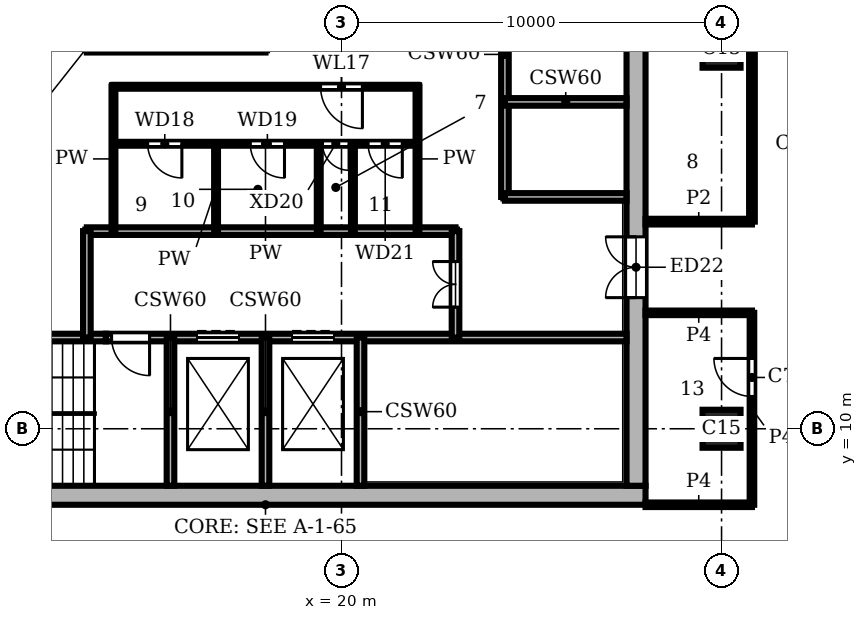
"""IFC4 building model, lengths in metres.
Left out: names, types, materials, properties, quantities, classifications, styles, units other than length and angle.
Written with IfcOpenShell. Run it as: python <this file> out.ifc"""

import sys

from ifc_helpers import new_model, si_unit, direction, frame, frame_2d, origin, origin_2d, place, context, subcontext, project, spatial, rectangle, extrude, element, fill, save


model = new_model("IFC4")
c1 = context("Model", 3, precision=1e-05, world=origin(), true_north=direction((0.0, 1.0)))
c2 = subcontext(c1, "Body", "Model", "MODEL_VIEW")
j1 = project(units=[si_unit("LENGTHUNIT", "METRE"), si_unit("PLANEANGLEUNIT", "RADIAN")], contexts=[c1])
p1 = place(None, origin())
s1 = spatial("IfcSite", under=j1, at=p1, CompositionType="ELEMENT")
p2 = place(p1, origin())
s2 = spatial("IfcBuilding", under=s1, at=p2, CompositionType="ELEMENT")
p3 = place(p2, frame((0.0, 0.0, 309.9)))
s3 = spatial("IfcBuildingStorey", under=s2, at=p3, CompositionType="ELEMENT", Elevation=309.9)
for number, where, z_axis, x_axis in (
    (1, (30.0, 10.0, 0.0), (0.0, 0.0, 1.0), (1.0, 0.0, 0.0)),
    (2, (30.0, 20.0, 0.0), (0.0, 0.0, 1.0), (1.0, 0.0, 0.0)),
):
    element("IfcColumn", number, at=place(p3, frame(where, z_axis=z_axis, x_axis=x_axis)), inside=s3, PredefinedType="COLUMN", context=c2, shape_type="SweptSolid", body=[
        extrude(rectangle(XDim=1.0, YDim=1.0, at=origin_2d()), origin(), (0.0, 0.0, 1.0), 3.9),
    ])
p4 = place(p3, frame((8.0, 8.25, 0.0), z_axis=(0.0, 0.0, 1.0), x_axis=(1.0, 0.0, 0.0)))
e3 = element("IfcWall", 3, at=p4, inside=s3, PredefinedType="SHEAR", context=c2, shape_type="SweptSolid", body=[
    extrude(rectangle(XDim=20.0, YDim=0.5, at=frame_2d((10.0, 0.0))), origin(), (0.0, 0.0, 1.0), 3.9),
])
p5 = place(p3, frame((27.75, 8.5, 0.0), z_axis=(0.0, 0.0, 1.0), x_axis=(0.0, 1.0, 0.0)))
e4 = element("IfcWall", 4, at=p5, inside=s3, PredefinedType="SHEAR", context=c2, shape_type="SweptSolid", body=[
    extrude(rectangle(XDim=19.0, YDim=0.5, at=frame_2d((9.5, 0.0))), origin(), (0.0, 0.0, 1.0), 3.9),
])
p6 = place(p5, frame((4.95, 0.0, 0.0)))
e5 = element("IfcOpeningElement", 5, at=p6, cuts=e4, PredefinedType="OPENING", context=c2, shape_type="SweptSolid", body=[
    extrude(rectangle(XDim=1.6, YDim=2.1, at=frame_2d((0.8, 1.05))), frame((0.0, 0.26, 0.0), z_axis=(0.0, -1.0, 0.0), x_axis=(1.0, 0.0, 0.0)), (0.0, 0.0, 1.0), 0.52),
])
p7 = place(p3, frame((8.5, 12.4, 0.0), z_axis=(0.0, 0.0, 1.0), x_axis=(1.0, 0.0, 0.0)))
e6 = element("IfcWall", 6, at=p7, inside=s3, PredefinedType="SHEAR", context=c2, shape_type="SweptSolid", body=[
    extrude(rectangle(XDim=5.3, YDim=0.2, at=frame_2d((2.65, 0.0))), origin(), (0.0, 0.0, 1.0), 3.58),
])
p8 = place(p3, frame((13.8, 12.4, 0.0), z_axis=(0.0, 0.0, 1.0), x_axis=(1.0, 0.0, 0.0)))
e7 = element("IfcWall", 7, at=p8, inside=s3, PredefinedType="SHEAR", context=c2, shape_type="SweptSolid", body=[
    extrude(rectangle(XDim=13.7, YDim=0.2, at=frame_2d((6.85, 0.0))), origin(), (0.0, 0.0, 1.0), 3.58),
])
p9 = place(p8, frame((2.4, 0.0, 0.0)))
e8 = element("IfcOpeningElement", 8, at=p9, cuts=e7, PredefinedType="OPENING", context=c2, shape_type="SweptSolid", body=[
    extrude(rectangle(XDim=1.1, YDim=2.1, at=frame_2d((0.55, 1.05))), frame((0.0, 0.11, 0.0), z_axis=(0.0, -1.0, 0.0), x_axis=(1.0, 0.0, 0.0)), (0.0, 0.0, 1.0), 0.22),
])
p10 = place(p8, frame((4.9, 0.0, 0.0)))
e9 = element("IfcOpeningElement", 9, at=p10, cuts=e7, PredefinedType="OPENING", context=c2, shape_type="SweptSolid", body=[
    extrude(rectangle(XDim=1.1, YDim=2.1, at=frame_2d((0.55, 1.05))), frame((0.0, 0.11, 0.0), z_axis=(0.0, -1.0, 0.0), x_axis=(1.0, 0.0, 0.0)), (0.0, 0.0, 1.0), 0.22),
])
p11 = place(p8, frame((0.15, 0.0, 0.0)))
e10 = element("IfcOpeningElement", 10, at=p11, cuts=e7, PredefinedType="OPENING", context=c2, shape_type="SweptSolid", body=[
    extrude(rectangle(XDim=1.0, YDim=2.1, at=frame_2d((0.5, 1.05))), frame((0.0, 0.11, 0.0), z_axis=(0.0, -1.0, 0.0), x_axis=(1.0, 0.0, 0.0)), (0.0, 0.0, 1.0), 0.22),
])
p12 = place(p3, frame((13.3, 15.2, 0.0), z_axis=(0.0, 0.0, 1.0), x_axis=(1.0, 0.0, 0.0)))
e11 = element("IfcWall", 11, at=p12, inside=s3, PredefinedType="SHEAR", context=c2, shape_type="SweptSolid", body=[
    extrude(rectangle(XDim=9.7, YDim=0.2, at=frame_2d((4.85, 0.0))), origin(), (0.0, 0.0, 1.0), 3.58),
])
p13 = place(p3, frame((24.3, 16.1, 0.0), z_axis=(0.0, 0.0, 1.0), x_axis=(1.0, 0.0, 0.0)))
e12 = element("IfcWall", 12, at=p13, inside=s3, PredefinedType="SHEAR", context=c2, shape_type="SweptSolid", body=[
    extrude(rectangle(XDim=3.2, YDim=0.2, at=frame_2d((1.6, 0.0))), origin(), (0.0, 0.0, 1.0), 3.58),
])
p14 = place(p3, frame((14.0, 17.5, 0.0), z_axis=(0.0, 0.0, 1.0), x_axis=(1.0, 0.0, 0.0)))
e13 = element("IfcWall", 13, at=p14, inside=s3, PredefinedType="PARTITIONING", context=c2, shape_type="SweptSolid", body=[
    extrude(rectangle(XDim=8.0, YDim=0.1, at=frame_2d((4.0, 0.0))), origin(), (0.0, 0.0, 1.0), 3.58),
])
p15 = place(p14, frame((0.9, 0.0, 0.0)))
e14 = element("IfcOpeningElement", 14, at=p15, cuts=e13, PredefinedType="OPENING", context=c2, shape_type="SweptSolid", body=[
    extrude(rectangle(XDim=0.9, YDim=2.1, at=frame_2d((0.45, 1.05))), frame((0.0, 0.06, 0.0), z_axis=(0.0, -1.0, 0.0), x_axis=(1.0, 0.0, 0.0)), (0.0, 0.0, 1.0), 0.12),
])
p16 = place(p14, frame((3.6, 0.0, 0.0)))
e15 = element("IfcOpeningElement", 15, at=p16, cuts=e13, PredefinedType="OPENING", context=c2, shape_type="SweptSolid", body=[
    extrude(rectangle(XDim=0.9, YDim=2.1, at=frame_2d((0.45, 1.05))), frame((0.0, 0.06, 0.0), z_axis=(0.0, -1.0, 0.0), x_axis=(1.0, 0.0, 0.0)), (0.0, 0.0, 1.0), 0.12),
])
p17 = place(p14, frame((5.5, 0.0, 0.0)))
e16 = element("IfcOpeningElement", 16, at=p17, cuts=e13, PredefinedType="OPENING", context=c2, shape_type="SweptSolid", body=[
    extrude(rectangle(XDim=0.7, YDim=2.1, at=frame_2d((0.35, 1.05))), frame((0.0, 0.06, 0.0), z_axis=(0.0, -1.0, 0.0), x_axis=(1.0, 0.0, 0.0)), (0.0, 0.0, 1.0), 0.12),
])
p18 = place(p14, frame((6.7, 0.0, 0.0)))
e17 = element("IfcOpeningElement", 17, at=p18, cuts=e13, PredefinedType="OPENING", context=c2, shape_type="SweptSolid", body=[
    extrude(rectangle(XDim=0.9, YDim=2.1, at=frame_2d((0.45, 1.05))), frame((0.0, 0.06, 0.0), z_axis=(0.0, -1.0, 0.0), x_axis=(1.0, 0.0, 0.0)), (0.0, 0.0, 1.0), 0.12),
])
p19 = place(p3, frame((24.3, 18.6, 0.0), z_axis=(0.0, 0.0, 1.0), x_axis=(1.0, 0.0, 0.0)))
e18 = element("IfcWall", 18, at=p19, inside=s3, PredefinedType="SHEAR", context=c2, shape_type="SweptSolid", body=[
    extrude(rectangle(XDim=3.2, YDim=0.2, at=frame_2d((1.6, 0.0))), origin(), (0.0, 0.0, 1.0), 3.58),
])
p20 = place(p3, frame((14.0, 19.0, 0.0), z_axis=(0.0, 0.0, 1.0), x_axis=(1.0, 0.0, 0.0)))
e19 = element("IfcWall", 19, at=p20, inside=s3, PredefinedType="PARTITIONING", context=c2, shape_type="SweptSolid", body=[
    extrude(rectangle(XDim=8.0, YDim=0.1, at=frame_2d((4.0, 0.0))), origin(), (0.0, 0.0, 1.0), 3.58),
])
p21 = place(p20, frame((5.45, 0.0, 0.0)))
e20 = element("IfcOpeningElement", 20, at=p21, cuts=e19, PredefinedType="OPENING", context=c2, shape_type="SweptSolid", body=[
    extrude(rectangle(XDim=1.1, YDim=2.1, at=frame_2d((0.55, 1.05))), frame((0.0, 0.06, 0.0), z_axis=(0.0, -1.0, 0.0), x_axis=(1.0, 0.0, 0.0)), (0.0, 0.0, 1.0), 0.12),
])
p22 = place(p3, frame((13.3, 12.4, 0.0), z_axis=(0.0, 0.0, 1.0), x_axis=(0.0, 1.0, 0.0)))
e21 = element("IfcWall", 21, at=p22, inside=s3, PredefinedType="SHEAR", context=c2, shape_type="SweptSolid", body=[
    extrude(rectangle(XDim=2.8, YDim=0.2, at=frame_2d((1.4, 0.0))), origin(), (0.0, 0.0, 1.0), 3.58),
])
p23 = place(p3, frame((14.0, 15.2, 0.0), z_axis=(0.0, 0.0, 1.0), x_axis=(0.0, 1.0, 0.0)))
e22 = element("IfcWall", 22, at=p23, inside=s3, PredefinedType="PARTITIONING", context=c2, shape_type="SweptSolid", body=[
    extrude(rectangle(XDim=3.8, YDim=0.1, at=frame_2d((1.9, 0.0))), origin(), (0.0, 0.0, 1.0), 3.58),
])
p24 = place(p3, frame((15.5, 8.5, 0.0), z_axis=(0.0, 0.0, 1.0), x_axis=(0.0, 1.0, 0.0)))
e23 = element("IfcWall", 23, at=p24, inside=s3, PredefinedType="SHEAR", context=c2, shape_type="SweptSolid", body=[
    extrude(rectangle(XDim=3.9, YDim=0.2, at=frame_2d((1.95, 0.0))), origin(), (0.0, 0.0, 1.0), 3.58),
])
p25 = place(p3, frame((16.7, 15.2, 0.0), z_axis=(0.0, 0.0, 1.0), x_axis=(0.0, 1.0, 0.0)))
e24 = element("IfcWall", 24, at=p25, inside=s3, PredefinedType="PARTITIONING", context=c2, shape_type="SweptSolid", body=[
    extrude(rectangle(XDim=2.3, YDim=0.1, at=frame_2d((1.15, 0.0))), origin(), (0.0, 0.0, 1.0), 3.58),
])
p26 = place(p3, frame((18.0, 8.5, 0.0), z_axis=(0.0, 0.0, 1.0), x_axis=(0.0, 1.0, 0.0)))
e25 = element("IfcWall", 25, at=p26, inside=s3, PredefinedType="SHEAR", context=c2, shape_type="SweptSolid", body=[
    extrude(rectangle(XDim=3.9, YDim=0.2, at=frame_2d((1.95, 0.0))), origin(), (0.0, 0.0, 1.0), 3.58),
])
for number, where, z_axis, x_axis in (
    (26, (19.4, 15.2, 0.0), (0.0, 0.0, 1.0), (0.0, 1.0, 0.0)),
    (27, (20.3, 15.2, 0.0), (0.0, 0.0, 1.0), (0.0, 1.0, 0.0)),
):
    element("IfcWall", number, at=place(p3, frame(where, z_axis=z_axis, x_axis=x_axis)), inside=s3, PredefinedType="PARTITIONING", context=c2, shape_type="SweptSolid", body=[
        extrude(rectangle(XDim=2.3, YDim=0.1, at=frame_2d((1.15, 0.0))), origin(), (0.0, 0.0, 1.0), 3.58),
    ])
p27 = place(p3, frame((20.5, 8.5, 0.0), z_axis=(0.0, 0.0, 1.0), x_axis=(0.0, 1.0, 0.0)))
e28 = element("IfcWall", 28, at=p27, inside=s3, PredefinedType="SHEAR", context=c2, shape_type="SweptSolid", body=[
    extrude(rectangle(XDim=3.9, YDim=0.2, at=frame_2d((1.95, 0.0))), origin(), (0.0, 0.0, 1.0), 3.58),
])
p28 = place(p3, frame((22.0, 15.2, 0.0), z_axis=(0.0, 0.0, 1.0), x_axis=(0.0, 1.0, 0.0)))
e29 = element("IfcWall", 29, at=p28, inside=s3, PredefinedType="PARTITIONING", context=c2, shape_type="SweptSolid", body=[
    extrude(rectangle(XDim=3.8, YDim=0.1, at=frame_2d((1.9, 0.0))), origin(), (0.0, 0.0, 1.0), 3.58),
])
p29 = place(p3, frame((23.0, 12.4, 0.0), z_axis=(0.0, 0.0, 1.0), x_axis=(0.0, 1.0, 0.0)))
e30 = element("IfcWall", 30, at=p29, inside=s3, PredefinedType="SHEAR", context=c2, shape_type="SweptSolid", body=[
    extrude(rectangle(XDim=2.8, YDim=0.2, at=frame_2d((1.4, 0.0))), origin(), (0.0, 0.0, 1.0), 3.58),
])
p30 = place(p29, frame((0.8, 0.0, 0.0)))
e31 = element("IfcOpeningElement", 31, at=p30, cuts=e30, PredefinedType="OPENING", context=c2, shape_type="SweptSolid", body=[
    extrude(rectangle(XDim=1.2, YDim=2.1, at=frame_2d((0.6, 1.05))), frame((0.0, 0.11, 0.0), z_axis=(0.0, -1.0, 0.0), x_axis=(1.0, 0.0, 0.0)), (0.0, 0.0, 1.0), 0.22),
])
p31 = place(p3, frame((24.3, 16.1, 0.0), z_axis=(0.0, 0.0, 1.0), x_axis=(0.0, 1.0, 0.0)))
e32 = element("IfcWall", 32, at=p31, inside=s3, PredefinedType="SHEAR", context=c2, shape_type="SweptSolid", body=[
    extrude(rectangle(XDim=7.5, YDim=0.2, at=frame_2d((3.75, 0.0))), origin(), (0.0, 0.0, 1.0), 3.58),
])
p32 = place(p31, frame((5.7, 0.0, 0.0)))
e33 = element("IfcOpeningElement", 33, at=p32, cuts=e32, PredefinedType="OPENING", context=c2, shape_type="SweptSolid", body=[
    extrude(rectangle(XDim=1.1, YDim=2.1, at=frame_2d((0.55, 1.05))), frame((0.0, 0.11, 0.0), z_axis=(0.0, -1.0, 0.0), x_axis=(1.0, 0.0, 0.0)), (0.0, 0.0, 1.0), 0.22),
])
p33 = place(p3, frame((30.8, 15.45, 0.0), z_axis=(0.0, 0.0, 1.0), x_axis=(0.0, 1.0, 0.0)))
e34 = element("IfcWall", 34, at=p33, inside=s3, PredefinedType="PARTITIONING", context=c2, shape_type="SweptSolid", body=[
    extrude(rectangle(XDim=15.15, YDim=0.15, at=frame_2d((7.575, 0.0))), origin(), (0.0, 0.0, 1.0), 3.58),
])
p34 = place(p33, frame((5.35, 0.0, 0.0)))
e35 = element("IfcOpeningElement", 35, at=p34, cuts=e34, PredefinedType="OPENING", context=c2, shape_type="SweptSolid", body=[
    extrude(rectangle(XDim=1.0, YDim=2.1, at=frame_2d((0.5, 1.05))), frame((0.0, 0.085, 0.0), z_axis=(0.0, -1.0, 0.0), x_axis=(1.0, 0.0, 0.0)), (0.0, 0.0, 1.0), 0.17),
])
p35 = place(p3, frame((28.0, 15.45, 0.0), z_axis=(0.0, 0.0, 1.0), x_axis=(1.0, 0.0, 0.0)))
e36 = element("IfcWall", 36, at=p35, inside=s3, PredefinedType="PARTITIONING", context=c2, shape_type="SweptSolid", body=[
    extrude(rectangle(XDim=2.8, YDim=0.15, at=frame_2d((1.4, 0.0))), origin(), (0.0, 0.0, 1.0), 3.58),
])
p36 = place(p3, frame((30.8, 8.0, 0.0), z_axis=(0.0, 0.0, 1.0), x_axis=(0.0, 1.0, 0.0)))
e37 = element("IfcWall", 37, at=p36, inside=s3, PredefinedType="PARTITIONING", context=c2, shape_type="SweptSolid", body=[
    extrude(rectangle(XDim=5.05, YDim=0.12, at=frame_2d((2.525, 0.0))), origin(), (0.0, 0.0, 1.0), 3.58),
])
p37 = place(p36, frame((2.85, 0.0, 0.0)))
e38 = element("IfcOpeningElement", 38, at=p37, cuts=e37, PredefinedType="OPENING", context=c2, shape_type="SweptSolid", body=[
    extrude(rectangle(XDim=1.0, YDim=2.1, at=frame_2d((0.5, 1.05))), frame((0.0, 0.07, 0.0), z_axis=(0.0, -1.0, 0.0), x_axis=(1.0, 0.0, 0.0)), (0.0, 0.0, 1.0), 0.14),
])
for number, where, z_axis, x_axis in (
    (39, (28.0, 8.0, 0.0), (0.0, 0.0, 1.0), (1.0, 0.0, 0.0)),
    (40, (28.0, 13.05, 0.0), (0.0, 0.0, 1.0), (1.0, 0.0, 0.0)),
):
    element("IfcWall", number, at=place(p3, frame(where, z_axis=z_axis, x_axis=x_axis)), inside=s3, PredefinedType="PARTITIONING", context=c2, shape_type="SweptSolid", body=[
        extrude(rectangle(XDim=2.8, YDim=0.12, at=frame_2d((1.4, 0.0))), origin(), (0.0, 0.0, 1.0), 3.58),
    ])
p38 = place(p9, origin())
e41 = element("IfcDoor", 41, at=p38, inside=s3, OperationType="DOUBLE_DOOR_SLIDING", PredefinedType="DOOR", context=c2, shape_type="SweptSolid", body=[
    extrude(rectangle(XDim=1.1, YDim=2.1, at=frame_2d((0.55, 1.05))), frame((0.0, 0.025, 0.0), z_axis=(0.0, -1.0, 0.0), x_axis=(1.0, 0.0, 0.0)), (0.0, 0.0, 1.0), 0.05),
])
fill(e8, e41)
p39 = place(p10, origin())
e42 = element("IfcDoor", 42, at=p39, inside=s3, OperationType="DOUBLE_DOOR_SLIDING", PredefinedType="DOOR", context=c2, shape_type="SweptSolid", body=[
    extrude(rectangle(XDim=1.1, YDim=2.1, at=frame_2d((0.55, 1.05))), frame((0.0, 0.025, 0.0), z_axis=(0.0, -1.0, 0.0), x_axis=(1.0, 0.0, 0.0)), (0.0, 0.0, 1.0), 0.05),
])
fill(e9, e42)
p40 = place(p11, frame((1.0, 0.0, 0.0), z_axis=(0.0, 0.0, 1.0), x_axis=(-1.0, 0.0, 0.0)))
e43 = element("IfcDoor", 43, at=p40, inside=s3, OperationType="SINGLE_SWING_LEFT", PredefinedType="DOOR", context=c2, shape_type="SweptSolid", body=[
    extrude(rectangle(XDim=1.0, YDim=2.1, at=frame_2d((0.5, 1.05))), frame((0.0, 0.025, 0.0), z_axis=(0.0, -1.0, 0.0), x_axis=(1.0, 0.0, 0.0)), (0.0, 0.0, 1.0), 0.05),
])
fill(e10, e43)
p41 = place(p30, origin())
e44 = element("IfcDoor", 44, at=p41, inside=s3, OperationType="DOUBLE_DOOR_SINGLE_SWING", PredefinedType="DOOR", context=c2, shape_type="SweptSolid", body=[
    extrude(rectangle(XDim=1.2, YDim=2.1, at=frame_2d((0.6, 1.05))), frame((0.0, 0.025, 0.0), z_axis=(0.0, -1.0, 0.0), x_axis=(1.0, 0.0, 0.0)), (0.0, 0.0, 1.0), 0.05),
])
fill(e31, e44)
p42 = place(p21, frame((1.1, 0.0, 0.0), z_axis=(0.0, 0.0, 1.0), x_axis=(-1.0, 0.0, 0.0)))
e45 = element("IfcDoor", 45, at=p42, inside=s3, OperationType="SINGLE_SWING_LEFT", PredefinedType="DOOR", context=c2, shape_type="SweptSolid", body=[
    extrude(rectangle(XDim=1.1, YDim=2.1, at=frame_2d((0.55, 1.05))), frame((0.0, 0.025, 0.0), z_axis=(0.0, -1.0, 0.0), x_axis=(1.0, 0.0, 0.0)), (0.0, 0.0, 1.0), 0.05),
])
fill(e20, e45)
p43 = place(p15, frame((0.9, 0.0, 0.0), z_axis=(0.0, 0.0, 1.0), x_axis=(-1.0, 0.0, 0.0)))
e46 = element("IfcDoor", 46, at=p43, inside=s3, OperationType="SINGLE_SWING_LEFT", PredefinedType="DOOR", context=c2, shape_type="SweptSolid", body=[
    extrude(rectangle(XDim=0.9, YDim=2.1, at=frame_2d((0.45, 1.05))), frame((0.0, 0.025, 0.0), z_axis=(0.0, -1.0, 0.0), x_axis=(1.0, 0.0, 0.0)), (0.0, 0.0, 1.0), 0.05),
])
fill(e14, e46)
p44 = place(p16, frame((0.9, 0.0, 0.0), z_axis=(0.0, 0.0, 1.0), x_axis=(-1.0, 0.0, 0.0)))
e47 = element("IfcDoor", 47, at=p44, inside=s3, OperationType="SINGLE_SWING_LEFT", PredefinedType="DOOR", context=c2, shape_type="SweptSolid", body=[
    extrude(rectangle(XDim=0.9, YDim=2.1, at=frame_2d((0.45, 1.05))), frame((0.0, 0.025, 0.0), z_axis=(0.0, -1.0, 0.0), x_axis=(1.0, 0.0, 0.0)), (0.0, 0.0, 1.0), 0.05),
])
fill(e15, e47)
p45 = place(p17, frame((0.7, 0.0, 0.0), z_axis=(0.0, 0.0, 1.0), x_axis=(-1.0, 0.0, 0.0)))
e48 = element("IfcDoor", 48, at=p45, inside=s3, OperationType="SINGLE_SWING_LEFT", PredefinedType="DOOR", context=c2, shape_type="SweptSolid", body=[
    extrude(rectangle(XDim=0.7, YDim=2.1, at=frame_2d((0.35, 1.05))), frame((0.0, 0.025, 0.0), z_axis=(0.0, -1.0, 0.0), x_axis=(1.0, 0.0, 0.0)), (0.0, 0.0, 1.0), 0.05),
])
fill(e16, e48)
p46 = place(p18, frame((0.9, 0.0, 0.0), z_axis=(0.0, 0.0, 1.0), x_axis=(-1.0, 0.0, 0.0)))
e49 = element("IfcDoor", 49, at=p46, inside=s3, OperationType="SINGLE_SWING_LEFT", PredefinedType="DOOR", context=c2, shape_type="SweptSolid", body=[
    extrude(rectangle(XDim=0.9, YDim=2.1, at=frame_2d((0.45, 1.05))), frame((0.0, 0.025, 0.0), z_axis=(0.0, -1.0, 0.0), x_axis=(1.0, 0.0, 0.0)), (0.0, 0.0, 1.0), 0.05),
])
fill(e17, e49)
p47 = place(p6, origin())
e50 = element("IfcDoor", 50, at=p47, inside=s3, OperationType="DOUBLE_DOOR_SINGLE_SWING", PredefinedType="DOOR", context=c2, shape_type="SweptSolid", body=[
    extrude(rectangle(XDim=1.6, YDim=2.1, at=frame_2d((0.8, 1.05))), frame((0.0, 0.025, 0.0), z_axis=(0.0, -1.0, 0.0), x_axis=(1.0, 0.0, 0.0)), (0.0, 0.0, 1.0), 0.05),
])
fill(e5, e50)
p48 = place(p37, origin())
e51 = element("IfcDoor", 51, at=p48, inside=s3, OperationType="SINGLE_SWING_RIGHT", PredefinedType="DOOR", context=c2, shape_type="SweptSolid", body=[
    extrude(rectangle(XDim=1.0, YDim=2.1, at=frame_2d((0.5, 1.05))), frame((0.0, 0.025, 0.0), z_axis=(0.0, -1.0, 0.0), x_axis=(1.0, 0.0, 0.0)), (0.0, 0.0, 1.0), 0.05),
])
fill(e38, e51)
save(model, sys.argv[1])
